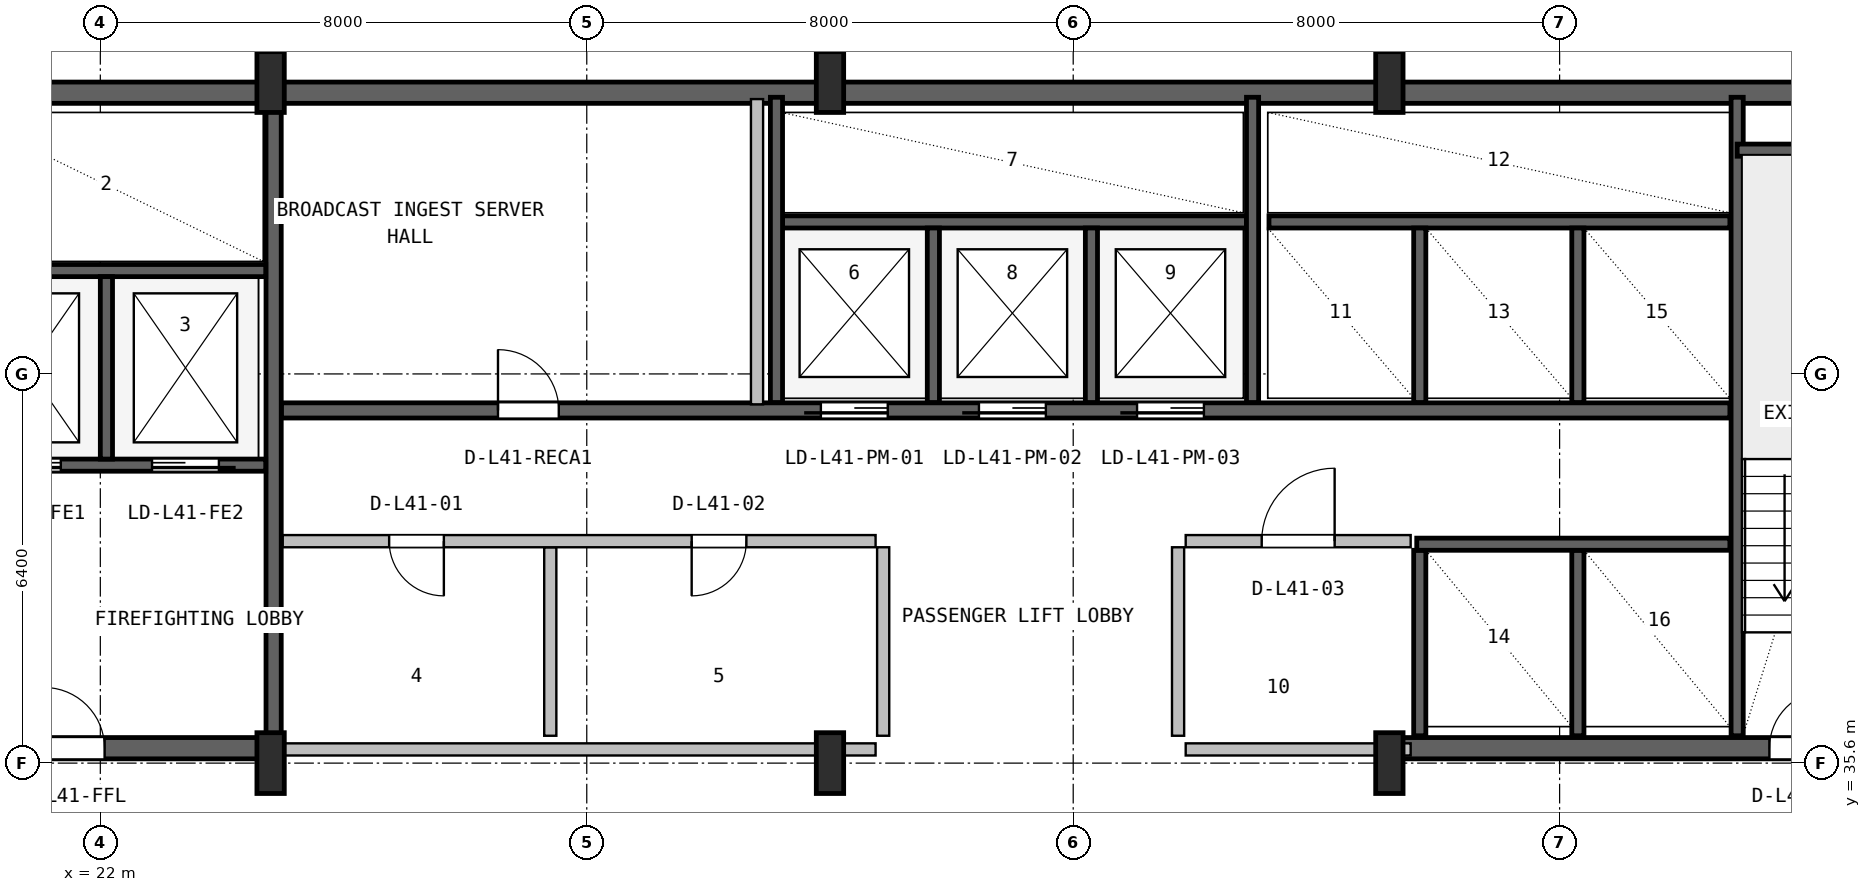
"""IFC4 building model, lengths in metres.
Left out: names, types, materials, properties, quantities, classifications, styles, units other than length and angle.
Written with IfcOpenShell. Run it as: python <this file> out.ifc"""

import sys

from ifc_helpers import new_model, si_unit, direction, frame, frame_2d, origin, origin_2d, place, context, subcontext, project, spatial, rectangle, i_section, extrude, source, transform, mapped, element, fill, save


model = new_model("IFC4")
c1 = context("Model", 3, precision=1e-05, world=origin(), true_north=direction((0.0, 1.0)))
c2 = subcontext(c1, "Body", "Model", "MODEL_VIEW")
j1 = project(units=[si_unit("LENGTHUNIT", "METRE"), si_unit("PLANEANGLEUNIT", "RADIAN")], contexts=[c1])
p1 = place(None, origin())
s1 = spatial("IfcSite", under=j1, at=p1, CompositionType="ELEMENT")
p2 = place(p1, origin())
s2 = spatial("IfcBuilding", under=s1, at=p2, CompositionType="ELEMENT")
p3 = place(p2, frame((0.0, 0.0, 168.6)))
s3 = spatial("IfcBuildingStorey", under=s2, at=p3, CompositionType="ELEMENT", Elevation=168.6)
p4 = place(p3, frame((15.6, 46.625, 0.0), z_axis=(0.0, 0.0, 1.0), x_axis=(1.0, 0.0, 0.0)))
e1 = element("IfcWall", 1, at=p4, inside=s3, PredefinedType="SHEAR", context=c2, shape_type="SweptSolid", body=[
    extrude(rectangle(XDim=36.8, YDim=0.35, at=frame_2d((18.4, 0.0))), origin(), (0.0, 0.0, 1.0), 3.55),
])
p5 = place(p3, frame((15.67, 35.845, 0.0), z_axis=(0.0, 0.0, 1.0), x_axis=(1.0, 0.0, 0.0)))
e2 = element("IfcWall", 2, at=p5, inside=s3, PredefinedType="SHEAR", context=c2, shape_type="SweptSolid", body=[
    extrude(rectangle(XDim=9.13, YDim=0.35, at=frame_2d((4.565, 0.0))), origin(), (0.0, 0.0, 1.0), 3.55),
])
p6 = place(p5, frame((5.4, 0.0, 0.0)))
e3 = element("IfcOpeningElement", 3, at=p6, cuts=e2, PredefinedType="OPENING", context=c2, shape_type="SweptSolid", body=[
    extrude(rectangle(XDim=1.0, YDim=2.1, at=frame_2d((0.5, 1.05))), frame((0.0, 0.185, 0.0), z_axis=(0.0, -1.0, 0.0), x_axis=(1.0, 0.0, 0.0)), (0.0, 0.0, 1.0), 0.37),
])
p7 = place(p3, frame((43.2, 35.845, 0.0), z_axis=(0.0, 0.0, 1.0), x_axis=(1.0, 0.0, 0.0)))
e4 = element("IfcWall", 4, at=p7, inside=s3, PredefinedType="SHEAR", context=c2, shape_type="SweptSolid", body=[
    extrude(rectangle(XDim=9.13, YDim=0.35, at=frame_2d((4.565, 0.0))), origin(), (0.0, 0.0, 1.0), 3.55),
])
p8 = place(p7, frame((6.25, 0.0, 0.0)))
e5 = element("IfcOpeningElement", 5, at=p8, cuts=e4, PredefinedType="OPENING", context=c2, shape_type="SweptSolid", body=[
    extrude(rectangle(XDim=0.95, YDim=2.1, at=frame_2d((0.475, 1.05))), frame((0.0, 0.185, 0.0), z_axis=(0.0, -1.0, 0.0), x_axis=(1.0, 0.0, 0.0)), (0.0, 0.0, 1.0), 0.37),
])
m1 = source(origin(), c2, "Body", "SweptSolid", [
    extrude(i_section(OverallWidth=0.45, OverallDepth=1.0, WebThickness=0.016, FlangeThickness=0.03, FilletRadius=0.016, at=origin_2d()), origin(), (0.0, 0.0, 1.0), 3.8),
])
for number, where, z_axis, x_axis in (
    (6, (24.8, 35.6, 0.0), (0.0, 0.0, 1.0), (1.0, 0.0, 0.0)),
    (7, (24.8, 46.8, 0.0), (0.0, 0.0, 1.0), (1.0, 0.0, 0.0)),
    (8, (34.0, 35.6, 0.0), (0.0, 0.0, 1.0), (1.0, 0.0, 0.0)),
    (9, (34.0, 46.8, 0.0), (0.0, 0.0, 1.0), (1.0, 0.0, 0.0)),
    (10, (43.2, 35.6, 0.0), (0.0, 0.0, 1.0), (1.0, 0.0, 0.0)),
    (11, (43.2, 46.8, 0.0), (0.0, 0.0, 1.0), (1.0, 0.0, 0.0)),
):
    element("IfcColumn", number, at=place(p3, frame(where, z_axis=z_axis, x_axis=x_axis)), inside=s3, PredefinedType="COLUMN", context=c2, shape_type="MappedRepresentation", body=[
        mapped(m1, transform((0.0, 0.0, 0.0), x_axis=(1.0, 0.0, 0.0), y_axis=(0.0, 1.0, 0.0), z_axis=(0.0, 0.0, 1.0), scale=1.0)),
    ])
p9 = place(p3, frame((24.85, 36.05, 0.0), z_axis=(0.0, 0.0, 1.0), x_axis=(0.0, 1.0, 0.0)))
e12 = element("IfcWall", 12, at=p9, inside=s3, PredefinedType="SHEAR", context=c2, shape_type="SweptSolid", body=[
    extrude(rectangle(XDim=10.45, YDim=0.25, at=frame_2d((5.225, 0.0))), origin(), (0.0, 0.0, 1.0), 3.55),
])
p10 = place(p3, frame((19.2, 40.5, 0.0), z_axis=(0.0, 0.0, 1.0), x_axis=(1.0, 0.0, 0.0)))
e13 = element("IfcWall", 13, at=p10, inside=s3, PredefinedType="SHEAR", context=c2, shape_type="SweptSolid", body=[
    extrude(rectangle(XDim=5.52, YDim=0.2, at=frame_2d((2.76, 0.0))), origin(), (0.0, 0.0, 1.0), 3.55),
])
p11 = place(p10, frame((1.05, 0.0, 0.0)))
e14 = element("IfcOpeningElement", 14, at=p11, cuts=e13, PredefinedType="OPENING", context=c2, shape_type="SweptSolid", body=[
    extrude(rectangle(XDim=1.1, YDim=2.18, at=frame_2d((0.55, 1.09))), frame((0.0, 0.11, 0.0), z_axis=(0.0, -1.0, 0.0), x_axis=(1.0, 0.0, 0.0)), (0.0, 0.0, 1.0), 0.22),
])
p12 = place(p10, frame((3.65, 0.0, 0.0)))
e15 = element("IfcOpeningElement", 15, at=p12, cuts=e13, PredefinedType="OPENING", context=c2, shape_type="SweptSolid", body=[
    extrude(rectangle(XDim=1.1, YDim=2.18, at=frame_2d((0.55, 1.09))), frame((0.0, 0.11, 0.0), z_axis=(0.0, -1.0, 0.0), x_axis=(1.0, 0.0, 0.0)), (0.0, 0.0, 1.0), 0.22),
])
p13 = place(p3, frame((19.2, 43.7, 0.0), z_axis=(0.0, 0.0, 1.0), x_axis=(1.0, 0.0, 0.0)))
e16 = element("IfcWall", 16, at=p13, inside=s3, PredefinedType="SHEAR", context=c2, shape_type="SweptSolid", body=[
    extrude(rectangle(XDim=5.52, YDim=0.2, at=frame_2d((2.76, 0.0))), origin(), (0.0, 0.0, 1.0), 3.55),
])
p14 = place(p3, frame((22.1, 40.6, 0.0), z_axis=(0.0, 0.0, 1.0), x_axis=(0.0, 1.0, 0.0)))
e17 = element("IfcWall", 17, at=p14, inside=s3, PredefinedType="SHEAR", context=c2, shape_type="SweptSolid", body=[
    extrude(rectangle(XDim=3.0, YDim=0.2, at=frame_2d((1.5, 0.0))), origin(), (0.0, 0.0, 1.0), 3.55),
])
p15 = place(p3, frame((48.92, 36.05, 0.0), z_axis=(0.0, 0.0, 1.0), x_axis=(0.0, 1.0, 0.0)))
e18 = element("IfcWall", 18, at=p15, inside=s3, PredefinedType="SHEAR", context=c2, shape_type="SweptSolid", body=[
    extrude(rectangle(XDim=10.5, YDim=0.2, at=frame_2d((5.25, 0.0))), origin(), (0.0, 0.0, 1.0), 3.55),
])
p16 = place(p3, frame((48.92, 45.68, 0.0), z_axis=(0.0, 0.0, 1.0), x_axis=(1.0, 0.0, 0.0)))
e19 = element("IfcWall", 19, at=p16, inside=s3, PredefinedType="SHEAR", context=c2, shape_type="SweptSolid", body=[
    extrude(rectangle(XDim=3.18, YDim=0.2, at=frame_2d((1.59, 0.0))), origin(), (0.0, 0.0, 1.0), 3.55),
])
p17 = place(p3, frame((24.98, 41.4, 0.0), z_axis=(0.0, 0.0, 1.0), x_axis=(1.0, 0.0, 0.0)))
e20 = element("IfcWall", 20, at=p17, inside=s3, PredefinedType="SHEAR", context=c2, shape_type="SweptSolid", body=[
    extrude(rectangle(XDim=23.82, YDim=0.25, at=frame_2d((11.91, 0.0))), origin(), (0.0, 0.0, 1.0), 3.55),
])
p18 = place(p17, frame((8.87, 0.0, 0.0)))
e21 = element("IfcOpeningElement", 21, at=p18, cuts=e20, PredefinedType="OPENING", context=c2, shape_type="SweptSolid", body=[
    extrude(rectangle(XDim=1.1, YDim=2.18, at=frame_2d((0.55, 1.09))), frame((0.0, 0.135, 0.0), z_axis=(0.0, -1.0, 0.0), x_axis=(1.0, 0.0, 0.0)), (0.0, 0.0, 1.0), 0.27),
])
p19 = place(p17, frame((11.47, 0.0, 0.0)))
e22 = element("IfcOpeningElement", 22, at=p19, cuts=e20, PredefinedType="OPENING", context=c2, shape_type="SweptSolid", body=[
    extrude(rectangle(XDim=1.1, YDim=2.18, at=frame_2d((0.55, 1.09))), frame((0.0, 0.135, 0.0), z_axis=(0.0, -1.0, 0.0), x_axis=(1.0, 0.0, 0.0)), (0.0, 0.0, 1.0), 0.27),
])
p20 = place(p17, frame((14.07, 0.0, 0.0)))
e23 = element("IfcOpeningElement", 23, at=p20, cuts=e20, PredefinedType="OPENING", context=c2, shape_type="SweptSolid", body=[
    extrude(rectangle(XDim=1.1, YDim=2.18, at=frame_2d((0.55, 1.09))), frame((0.0, 0.135, 0.0), z_axis=(0.0, -1.0, 0.0), x_axis=(1.0, 0.0, 0.0)), (0.0, 0.0, 1.0), 0.27),
])
p21 = place(p17, frame((3.56, 0.0, 0.0)))
e24 = element("IfcOpeningElement", 24, at=p21, cuts=e20, PredefinedType="OPENING", context=c2, shape_type="SweptSolid", body=[
    extrude(rectangle(XDim=1.0, YDim=2.08, at=frame_2d((0.5, 1.04))), frame((0.0, 0.135, 0.0), z_axis=(0.0, -1.0, 0.0), x_axis=(1.0, 0.0, 0.0)), (0.0, 0.0, 1.0), 0.27),
])
p22 = place(p3, frame((33.22, 44.5, 0.0), z_axis=(0.0, 0.0, 1.0), x_axis=(1.0, 0.0, 0.0)))
e25 = element("IfcWall", 25, at=p22, inside=s3, PredefinedType="SHEAR", context=c2, shape_type="SweptSolid", body=[
    extrude(rectangle(XDim=7.63, YDim=0.2, at=frame_2d((3.815, 0.0))), origin(), (0.0, 0.0, 1.0), 3.55),
])
p23 = place(p3, frame((33.12, 41.53, 0.0), z_axis=(0.0, 0.0, 1.0), x_axis=(0.0, 1.0, 0.0)))
e26 = element("IfcWall", 26, at=p23, inside=s3, PredefinedType="SHEAR", context=c2, shape_type="SweptSolid", body=[
    extrude(rectangle(XDim=5.02, YDim=0.2, at=frame_2d((2.51, 0.0))), origin(), (0.0, 0.0, 1.0), 3.55),
])
for number, where, z_axis, x_axis in (
    (27, (35.7, 41.53, 0.0), (0.0, 0.0, 1.0), (0.0, 1.0, 0.0)),
    (28, (38.3, 41.53, 0.0), (0.0, 0.0, 1.0), (0.0, 1.0, 0.0)),
):
    element("IfcWall", number, at=place(p3, frame(where, z_axis=z_axis, x_axis=x_axis)), inside=s3, PredefinedType="SHEAR", context=c2, shape_type="SweptSolid", body=[
        extrude(rectangle(XDim=2.87, YDim=0.2, at=frame_2d((1.435, 0.0))), origin(), (0.0, 0.0, 1.0), 3.55),
    ])
p24 = place(p3, frame((40.95, 41.53, 0.0), z_axis=(0.0, 0.0, 1.0), x_axis=(0.0, 1.0, 0.0)))
e29 = element("IfcWall", 29, at=p24, inside=s3, PredefinedType="SHEAR", context=c2, shape_type="SweptSolid", body=[
    extrude(rectangle(XDim=5.02, YDim=0.2, at=frame_2d((2.51, 0.0))), origin(), (0.0, 0.0, 1.0), 3.55),
])
p25 = place(p3, frame((41.22, 44.5, 0.0), z_axis=(0.0, 0.0, 1.0), x_axis=(1.0, 0.0, 0.0)))
e30 = element("IfcWall", 30, at=p25, inside=s3, PredefinedType="SHEAR", context=c2, shape_type="SweptSolid", body=[
    extrude(rectangle(XDim=7.58, YDim=0.2, at=frame_2d((3.79, 0.0))), origin(), (0.0, 0.0, 1.0), 3.55),
])
for number, where, z_axis, x_axis in (
    (31, (43.7, 41.53, 0.0), (0.0, 0.0, 1.0), (0.0, 1.0, 0.0)),
    (32, (46.3, 41.53, 0.0), (0.0, 0.0, 1.0), (0.0, 1.0, 0.0)),
):
    element("IfcWall", number, at=place(p3, frame(where, z_axis=z_axis, x_axis=x_axis)), inside=s3, PredefinedType="SHEAR", context=c2, shape_type="SweptSolid", body=[
        extrude(rectangle(XDim=2.87, YDim=0.2, at=frame_2d((1.435, 0.0))), origin(), (0.0, 0.0, 1.0), 3.55),
    ])
for number, where, z_axis, x_axis in (
    (33, (43.7, 36.05, 0.0), (0.0, 0.0, 1.0), (0.0, 1.0, 0.0)),
    (34, (46.3, 36.05, 0.0), (0.0, 0.0, 1.0), (0.0, 1.0, 0.0)),
):
    element("IfcWall", number, at=place(p3, frame(where, z_axis=z_axis, x_axis=x_axis)), inside=s3, PredefinedType="SHEAR", context=c2, shape_type="SweptSolid", body=[
        extrude(rectangle(XDim=3.05, YDim=0.2, at=frame_2d((1.525, 0.0))), origin(), (0.0, 0.0, 1.0), 3.55),
    ])
p26 = place(p3, frame((43.65, 39.2, 0.0), z_axis=(0.0, 0.0, 1.0), x_axis=(1.0, 0.0, 0.0)))
e35 = element("IfcWall", 35, at=p26, inside=s3, PredefinedType="SHEAR", context=c2, shape_type="SweptSolid", body=[
    extrude(rectangle(XDim=5.15, YDim=0.2, at=frame_2d((2.575, 0.0))), origin(), (0.0, 0.0, 1.0), 3.55),
])
p27 = place(p3, frame((25.0, 35.825, 0.0), z_axis=(0.0, 0.0, 1.0), x_axis=(1.0, 0.0, 0.0)))
e36 = element("IfcWall", 36, at=p27, inside=s3, PredefinedType="PLUMBINGWALL", context=c2, shape_type="SweptSolid", body=[
    extrude(rectangle(XDim=9.75, YDim=0.2, at=frame_2d((4.875, 0.0))), origin(), (0.0, 0.0, 1.0), 2.575),
])
p28 = place(p3, frame((29.4, 36.05, 0.0), z_axis=(0.0, 0.0, 1.0), x_axis=(0.0, 1.0, 0.0)))
e37 = element("IfcWall", 37, at=p28, inside=s3, PredefinedType="PLUMBINGWALL", context=c2, shape_type="SweptSolid", body=[
    extrude(rectangle(XDim=3.1, YDim=0.2, at=frame_2d((1.55, 0.0))), origin(), (0.0, 0.0, 1.0), 3.53),
])
p29 = place(p3, frame((25.0, 39.25, 0.0), z_axis=(0.0, 0.0, 1.0), x_axis=(1.0, 0.0, 0.0)))
e38 = element("IfcWall", 38, at=p29, inside=s3, PredefinedType="PLUMBINGWALL", context=c2, shape_type="SweptSolid", body=[
    extrude(rectangle(XDim=9.75, YDim=0.2, at=frame_2d((4.875, 0.0))), origin(), (0.0, 0.0, 1.0), 3.53),
])
p30 = place(p29, frame((1.75, 0.0, 0.0)))
e39 = element("IfcOpeningElement", 39, at=p30, cuts=e38, PredefinedType="OPENING", context=c2, shape_type="SweptSolid", body=[
    extrude(rectangle(XDim=0.9, YDim=2.06, at=frame_2d((0.45, 1.03))), frame((0.0, 0.11, 0.0), z_axis=(0.0, -1.0, 0.0), x_axis=(1.0, 0.0, 0.0)), (0.0, 0.0, 1.0), 0.22),
])
p31 = place(p29, frame((6.725, 0.0, 0.0)))
e40 = element("IfcOpeningElement", 40, at=p31, cuts=e38, PredefinedType="OPENING", context=c2, shape_type="SweptSolid", body=[
    extrude(rectangle(XDim=0.9, YDim=2.06, at=frame_2d((0.45, 1.03))), frame((0.0, 0.11, 0.0), z_axis=(0.0, -1.0, 0.0), x_axis=(1.0, 0.0, 0.0)), (0.0, 0.0, 1.0), 0.22),
])
p32 = place(p3, frame((34.875, 36.05, 0.0), z_axis=(0.0, 0.0, 1.0), x_axis=(0.0, 1.0, 0.0)))
e41 = element("IfcWall", 41, at=p32, inside=s3, PredefinedType="PLUMBINGWALL", context=c2, shape_type="SweptSolid", body=[
    extrude(rectangle(XDim=3.1, YDim=0.2, at=frame_2d((1.55, 0.0))), origin(), (0.0, 0.0, 1.0), 3.53),
])
p33 = place(p3, frame((39.85, 35.825, 0.0), z_axis=(0.0, 0.0, 1.0), x_axis=(1.0, 0.0, 0.0)))
e42 = element("IfcWall", 42, at=p33, inside=s3, PredefinedType="SOLIDWALL", context=c2, shape_type="SweptSolid", body=[
    extrude(rectangle(XDim=3.7, YDim=0.2, at=frame_2d((1.85, 0.0))), origin(), (0.0, 0.0, 1.0), 2.575),
])
p34 = place(p3, frame((39.85, 39.25, 0.0), z_axis=(0.0, 0.0, 1.0), x_axis=(1.0, 0.0, 0.0)))
e43 = element("IfcWall", 43, at=p34, inside=s3, PredefinedType="SOLIDWALL", context=c2, shape_type="SweptSolid", body=[
    extrude(rectangle(XDim=3.7, YDim=0.2, at=frame_2d((1.85, 0.0))), origin(), (0.0, 0.0, 1.0), 3.53),
])
p35 = place(p34, frame((1.25, 0.0, 0.0)))
e44 = element("IfcOpeningElement", 44, at=p35, cuts=e43, PredefinedType="OPENING", context=c2, shape_type="SweptSolid", body=[
    extrude(rectangle(XDim=1.2, YDim=2.1, at=frame_2d((0.6, 1.05))), frame((0.0, 0.11, 0.0), z_axis=(0.0, -1.0, 0.0), x_axis=(1.0, 0.0, 0.0)), (0.0, 0.0, 1.0), 0.22),
])
p36 = place(p3, frame((39.725, 36.05, 0.0), z_axis=(0.0, 0.0, 1.0), x_axis=(0.0, 1.0, 0.0)))
e45 = element("IfcWall", 45, at=p36, inside=s3, PredefinedType="SOLIDWALL", context=c2, shape_type="SweptSolid", body=[
    extrude(rectangle(XDim=3.1, YDim=0.2, at=frame_2d((1.55, 0.0))), origin(), (0.0, 0.0, 1.0), 3.53),
])
p37 = place(p3, frame((32.8, 41.5, 0.0), z_axis=(0.0, 0.0, 1.0), x_axis=(0.0, 1.0, 0.0)))
e46 = element("IfcWall", 46, at=p37, inside=s3, PredefinedType="SOLIDWALL", context=c2, shape_type="SweptSolid", body=[
    extrude(rectangle(XDim=5.02, YDim=0.2, at=frame_2d((2.51, 0.0))), origin(), (0.0, 0.0, 1.0), 3.53),
])
m2 = source(origin(), c2, "Body", "SweptSolid", [
    extrude(rectangle(XDim=1.0, YDim=2.1, at=frame_2d((0.5, 1.05))), frame((0.0, 0.025, 0.0), z_axis=(0.0, -1.0, 0.0), x_axis=(1.0, 0.0, 0.0)), (0.0, 0.0, 1.0), 0.05),
])
p38 = place(p6, origin())
e47 = element("IfcDoor", 47, at=p38, inside=s3, OperationType="SINGLE_SWING_LEFT", PredefinedType="DOOR", context=c2, shape_type="MappedRepresentation", body=[
    mapped(m2, transform((0.0, 0.0, 0.0), x_axis=(1.0, 0.0, 0.0), y_axis=(0.0, 1.0, 0.0), z_axis=(0.0, 0.0, 1.0), scale=1.0)),
])
fill(e3, e47)
m3 = source(origin(), c2, "Body", "SweptSolid", [
    extrude(rectangle(XDim=1.1, YDim=2.18, at=frame_2d((0.55, 1.09))), frame((0.0, 0.025, 0.0), z_axis=(0.0, -1.0, 0.0), x_axis=(1.0, 0.0, 0.0)), (0.0, 0.0, 1.0), 0.05),
])
p39 = place(p11, frame((1.1, 0.0, 0.0), z_axis=(0.0, 0.0, 1.0), x_axis=(-1.0, 0.0, 0.0)))
e48 = element("IfcDoor", 48, at=p39, inside=s3, OperationType="SLIDING_TO_LEFT", PredefinedType="DOOR", context=c2, shape_type="MappedRepresentation", body=[
    mapped(m3, transform((0.0, 0.0, 0.0), x_axis=(1.0, 0.0, 0.0), y_axis=(0.0, 1.0, 0.0), z_axis=(0.0, 0.0, 1.0), scale=1.0)),
])
fill(e14, e48)
p40 = place(p12, frame((1.1, 0.0, 0.0), z_axis=(0.0, 0.0, 1.0), x_axis=(-1.0, 0.0, 0.0)))
e49 = element("IfcDoor", 49, at=p40, inside=s3, OperationType="SLIDING_TO_RIGHT", PredefinedType="DOOR", context=c2, shape_type="MappedRepresentation", body=[
    mapped(m3, transform((0.0, 0.0, 0.0), x_axis=(1.0, 0.0, 0.0), y_axis=(0.0, 1.0, 0.0), z_axis=(0.0, 0.0, 1.0), scale=1.0)),
])
fill(e15, e49)
m4 = source(origin(), c2, "Body", "SweptSolid", [
    extrude(rectangle(XDim=0.95, YDim=2.1, at=frame_2d((0.475, 1.05))), frame((0.0, 0.025, 0.0), z_axis=(0.0, -1.0, 0.0), x_axis=(1.0, 0.0, 0.0)), (0.0, 0.0, 1.0), 0.05),
])
p41 = place(p8, origin())
e50 = element("IfcDoor", 50, at=p41, inside=s3, OperationType="SINGLE_SWING_RIGHT", PredefinedType="DOOR", context=c2, shape_type="MappedRepresentation", body=[
    mapped(m4, transform((0.0, 0.0, 0.0), x_axis=(1.0, 0.0, 0.0), y_axis=(0.0, 1.0, 0.0), z_axis=(0.0, 0.0, 1.0), scale=1.0)),
])
fill(e5, e50)
p42 = place(p18, frame((1.1, 0.0, 0.0), z_axis=(0.0, 0.0, 1.0), x_axis=(-1.0, 0.0, 0.0)))
e51 = element("IfcDoor", 51, at=p42, inside=s3, OperationType="SLIDING_TO_LEFT", PredefinedType="DOOR", context=c2, shape_type="MappedRepresentation", body=[
    mapped(m3, transform((0.0, 0.0, 0.0), x_axis=(1.0, 0.0, 0.0), y_axis=(0.0, 1.0, 0.0), z_axis=(0.0, 0.0, 1.0), scale=1.0)),
])
fill(e21, e51)
p43 = place(p19, frame((1.1, 0.0, 0.0), z_axis=(0.0, 0.0, 1.0), x_axis=(-1.0, 0.0, 0.0)))
e52 = element("IfcDoor", 52, at=p43, inside=s3, OperationType="SLIDING_TO_LEFT", PredefinedType="DOOR", context=c2, shape_type="MappedRepresentation", body=[
    mapped(m3, transform((0.0, 0.0, 0.0), x_axis=(1.0, 0.0, 0.0), y_axis=(0.0, 1.0, 0.0), z_axis=(0.0, 0.0, 1.0), scale=1.0)),
])
fill(e22, e52)
p44 = place(p20, frame((1.1, 0.0, 0.0), z_axis=(0.0, 0.0, 1.0), x_axis=(-1.0, 0.0, 0.0)))
e53 = element("IfcDoor", 53, at=p44, inside=s3, OperationType="SLIDING_TO_LEFT", PredefinedType="DOOR", context=c2, shape_type="MappedRepresentation", body=[
    mapped(m3, transform((0.0, 0.0, 0.0), x_axis=(1.0, 0.0, 0.0), y_axis=(0.0, 1.0, 0.0), z_axis=(0.0, 0.0, 1.0), scale=1.0)),
])
fill(e23, e53)
m5 = source(origin(), c2, "Body", "SweptSolid", [
    extrude(rectangle(XDim=1.0, YDim=2.08, at=frame_2d((0.5, 1.04))), frame((0.0, 0.025, 0.0), z_axis=(0.0, -1.0, 0.0), x_axis=(1.0, 0.0, 0.0)), (0.0, 0.0, 1.0), 0.05),
])
p45 = place(p21, origin())
e54 = element("IfcDoor", 54, at=p45, inside=s3, OperationType="SINGLE_SWING_LEFT", PredefinedType="DOOR", context=c2, shape_type="MappedRepresentation", body=[
    mapped(m5, transform((0.0, 0.0, 0.0), x_axis=(1.0, 0.0, 0.0), y_axis=(0.0, 1.0, 0.0), z_axis=(0.0, 0.0, 1.0), scale=1.0)),
])
fill(e24, e54)
m6 = source(origin(), c2, "Body", "SweptSolid", [
    extrude(rectangle(XDim=0.9, YDim=2.06, at=frame_2d((0.45, 1.03))), frame((0.0, 0.025, 0.0), z_axis=(0.0, -1.0, 0.0), x_axis=(1.0, 0.0, 0.0)), (0.0, 0.0, 1.0), 0.05),
])
p46 = place(p30, frame((0.9, 0.0, 0.0), z_axis=(0.0, 0.0, 1.0), x_axis=(-1.0, 0.0, 0.0)))
e55 = element("IfcDoor", 55, at=p46, inside=s3, OperationType="SINGLE_SWING_RIGHT", PredefinedType="DOOR", context=c2, shape_type="MappedRepresentation", body=[
    mapped(m6, transform((0.0, 0.0, 0.0), x_axis=(1.0, 0.0, 0.0), y_axis=(0.0, 1.0, 0.0), z_axis=(0.0, 0.0, 1.0), scale=1.0)),
])
fill(e39, e55)
p47 = place(p31, frame((0.9, 0.0, 0.0), z_axis=(0.0, 0.0, 1.0), x_axis=(-1.0, 0.0, 0.0)))
e56 = element("IfcDoor", 56, at=p47, inside=s3, OperationType="SINGLE_SWING_LEFT", PredefinedType="DOOR", context=c2, shape_type="MappedRepresentation", body=[
    mapped(m6, transform((0.0, 0.0, 0.0), x_axis=(1.0, 0.0, 0.0), y_axis=(0.0, 1.0, 0.0), z_axis=(0.0, 0.0, 1.0), scale=1.0)),
])
fill(e40, e56)
m7 = source(origin(), c2, "Body", "SweptSolid", [
    extrude(rectangle(XDim=1.2, YDim=2.1, at=frame_2d((0.6, 1.05))), frame((0.0, 0.025, 0.0), z_axis=(0.0, -1.0, 0.0), x_axis=(1.0, 0.0, 0.0)), (0.0, 0.0, 1.0), 0.05),
])
p48 = place(p35, origin())
e57 = element("IfcDoor", 57, at=p48, inside=s3, OperationType="SINGLE_SWING_RIGHT", PredefinedType="DOOR", context=c2, shape_type="MappedRepresentation", body=[
    mapped(m7, transform((0.0, 0.0, 0.0), x_axis=(1.0, 0.0, 0.0), y_axis=(0.0, 1.0, 0.0), z_axis=(0.0, 0.0, 1.0), scale=1.0)),
])
fill(e44, e57)
save(model, sys.argv[1])
